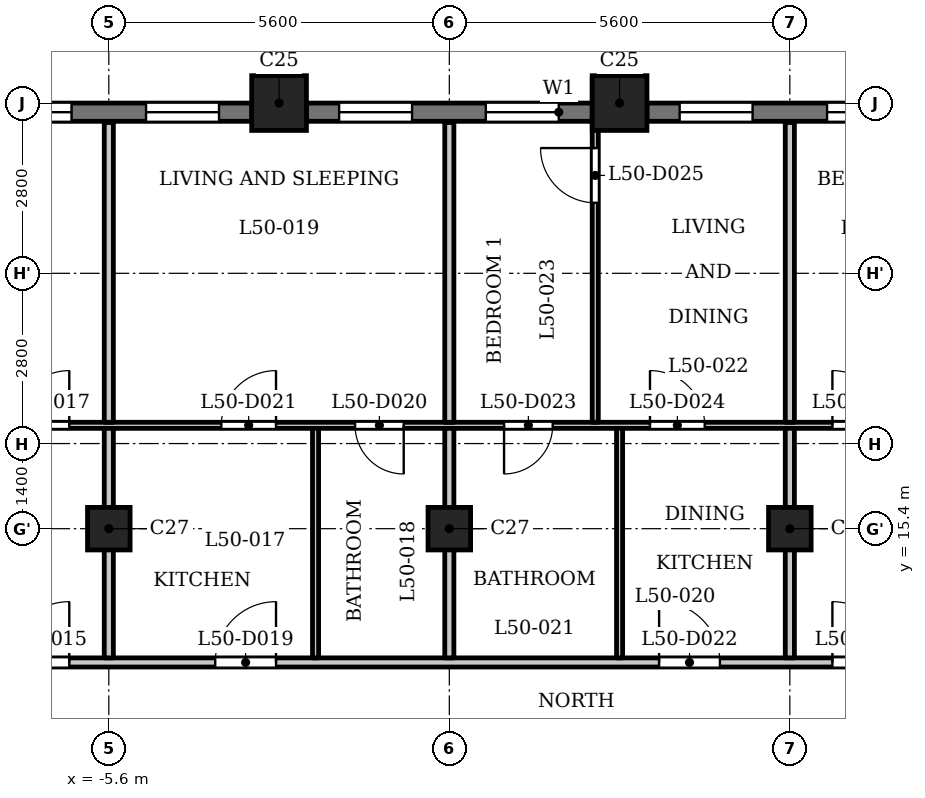
"""IFC4 building model, lengths in metres.
Left out: names, types, materials, properties, quantities, classifications, styles, units other than length and angle.
Written with IfcOpenShell. Run it as: python <this file> out.ifc"""

import sys

from ifc_helpers import new_model, si_unit, direction, frame, frame_2d, origin, origin_2d, place, context, subcontext, project, spatial, rectangle, extrude, element, fill, save


model = new_model("IFC4")
c1 = context("Model", 3, precision=1e-05, world=origin(), true_north=direction((0.0, 1.0)))
c2 = subcontext(c1, "Body", "Model", "MODEL_VIEW")
j1 = project(units=[si_unit("LENGTHUNIT", "METRE"), si_unit("PLANEANGLEUNIT", "RADIAN")], contexts=[c1])
p1 = place(None, origin())
s1 = spatial("IfcSite", under=j1, at=p1, CompositionType="ELEMENT")
p2 = place(p1, origin())
s2 = spatial("IfcBuilding", under=s1, at=p2, CompositionType="ELEMENT")
p3 = place(p2, frame((0.0, 0.0, 195.9)))
s3 = spatial("IfcBuildingStorey", under=s2, at=p3, CompositionType="ELEMENT", Elevation=195.9)
for number, where, z_axis, x_axis in (
    (1, (2.8, 22.4, 0.0), (0.0, 0.0, 1.0), (1.0, 0.0, 0.0)),
    (2, (-2.8, 22.4, 0.0), (0.0, 0.0, 1.0), (1.0, 0.0, 0.0)),
):
    element("IfcColumn", number, at=place(p3, frame(where, z_axis=z_axis, x_axis=x_axis)), inside=s3, PredefinedType="COLUMN", context=c2, shape_type="SweptSolid", body=[
        extrude(rectangle(XDim=0.9, YDim=0.9, at=origin_2d()), origin(), (0.0, 0.0, 1.0), 3.5),
    ])
for number, where, z_axis, x_axis in (
    (3, (-5.6, 15.4, 0.0), (0.0, 0.0, 1.0), (1.0, 0.0, 0.0)),
    (4, (0.0, 15.4, 0.0), (0.0, 0.0, 1.0), (1.0, 0.0, 0.0)),
    (5, (5.6, 15.4, 0.0), (0.0, 0.0, 1.0), (1.0, 0.0, 0.0)),
):
    element("IfcColumn", number, at=place(p3, frame(where, z_axis=z_axis, x_axis=x_axis)), inside=s3, PredefinedType="COLUMN", context=c2, shape_type="SweptSolid", body=[
        extrude(rectangle(XDim=0.7, YDim=0.7, at=origin_2d()), origin(), (0.0, 0.0, 1.0), 3.5),
    ])
p4 = place(p3, frame((7.95, 22.25, 0.0), z_axis=(0.0, 0.0, 1.0), x_axis=(-1.0, 0.0, 0.0)))
e6 = element("IfcWall", 6, at=p4, inside=s3, PredefinedType="SOLIDWALL", context=c2, shape_type="SweptSolid", body=[
    extrude(rectangle(XDim=4.7, YDim=0.3, at=frame_2d((2.35, 0.0))), origin(), (0.0, 0.0, 1.0), 2.5),
])
p5 = place(p4, frame((0.538, 0.0, 0.6)))
e7 = element("IfcOpeningElement", 7, at=p5, cuts=e6, PredefinedType="OPENING", context=c2, shape_type="SweptSolid", body=[
    extrude(rectangle(XDim=1.2, YDim=1.55, at=frame_2d((0.6, 0.775))), frame((0.0, 0.16, 0.0), z_axis=(0.0, -1.0, 0.0), x_axis=(1.0, 0.0, 0.0)), (0.0, 0.0, 1.0), 0.32),
])
p6 = place(p4, frame((2.962, 0.0, 0.6)))
e8 = element("IfcOpeningElement", 8, at=p6, cuts=e6, PredefinedType="OPENING", context=c2, shape_type="SweptSolid", body=[
    extrude(rectangle(XDim=1.2, YDim=1.55, at=frame_2d((0.6, 0.775))), frame((0.0, 0.16, 0.0), z_axis=(0.0, -1.0, 0.0), x_axis=(1.0, 0.0, 0.0)), (0.0, 0.0, 1.0), 0.32),
])
p7 = place(p3, frame((2.35, 22.25, 0.0), z_axis=(0.0, 0.0, 1.0), x_axis=(-1.0, 0.0, 0.0)))
e9 = element("IfcWall", 9, at=p7, inside=s3, PredefinedType="SOLIDWALL", context=c2, shape_type="SweptSolid", body=[
    extrude(rectangle(XDim=4.7, YDim=0.3, at=frame_2d((2.35, 0.0))), origin(), (0.0, 0.0, 1.0), 2.5),
])
p8 = place(p7, frame((0.55, 0.0, 0.6)))
e10 = element("IfcOpeningElement", 10, at=p8, cuts=e9, PredefinedType="OPENING", context=c2, shape_type="SweptSolid", body=[
    extrude(rectangle(XDim=1.2, YDim=1.55, at=frame_2d((0.6, 0.775))), frame((0.0, 0.16, 0.0), z_axis=(0.0, -1.0, 0.0), x_axis=(1.0, 0.0, 0.0)), (0.0, 0.0, 1.0), 0.32),
])
p9 = place(p7, frame((2.962, 0.0, 0.6)))
e11 = element("IfcOpeningElement", 11, at=p9, cuts=e9, PredefinedType="OPENING", context=c2, shape_type="SweptSolid", body=[
    extrude(rectangle(XDim=1.2, YDim=1.55, at=frame_2d((0.6, 0.775))), frame((0.0, 0.16, 0.0), z_axis=(0.0, -1.0, 0.0), x_axis=(1.0, 0.0, 0.0)), (0.0, 0.0, 1.0), 0.32),
])
p10 = place(p3, frame((-3.25, 22.25, 0.0), z_axis=(0.0, 0.0, 1.0), x_axis=(-1.0, 0.0, 0.0)))
e12 = element("IfcWall", 12, at=p10, inside=s3, PredefinedType="SOLIDWALL", context=c2, shape_type="SweptSolid", body=[
    extrude(rectangle(XDim=4.7, YDim=0.3, at=frame_2d((2.35, 0.0))), origin(), (0.0, 0.0, 1.0), 2.5),
])
p11 = place(p10, frame((0.538, 0.0, 0.6)))
e13 = element("IfcOpeningElement", 13, at=p11, cuts=e12, PredefinedType="OPENING", context=c2, shape_type="SweptSolid", body=[
    extrude(rectangle(XDim=1.2, YDim=1.55, at=frame_2d((0.6, 0.775))), frame((0.0, 0.16, 0.0), z_axis=(0.0, -1.0, 0.0), x_axis=(1.0, 0.0, 0.0)), (0.0, 0.0, 1.0), 0.32),
])
p12 = place(p10, frame((2.962, 0.0, 0.6)))
e14 = element("IfcOpeningElement", 14, at=p12, cuts=e12, PredefinedType="OPENING", context=c2, shape_type="SweptSolid", body=[
    extrude(rectangle(XDim=1.2, YDim=1.55, at=frame_2d((0.6, 0.775))), frame((0.0, 0.16, 0.0), z_axis=(0.0, -1.0, 0.0), x_axis=(1.0, 0.0, 0.0)), (0.0, 0.0, 1.0), 0.32),
])
p13 = place(p3, frame((-17.4, 13.2, 0.0), z_axis=(0.0, 0.0, 1.0), x_axis=(1.0, 0.0, 0.0)))
e15 = element("IfcWall", 15, at=p13, inside=s3, PredefinedType="PARTITIONING", context=c2, shape_type="SweptSolid", body=[
    extrude(rectangle(XDim=34.8, YDim=0.15, at=frame_2d((17.4, 0.0))), origin(), (0.0, 0.0, 1.0), 3.2),
])
p14 = place(p13, frame((0.25, 0.0, 0.0)))
e16 = element("IfcOpeningElement", 16, at=p14, cuts=e15, PredefinedType="OPENING", context=c2, shape_type="SweptSolid", body=[
    extrude(rectangle(XDim=1.0, YDim=2.1, at=frame_2d((0.5, 1.05))), frame((0.0, 0.085, 0.0), z_axis=(0.0, -1.0, 0.0), x_axis=(1.0, 0.0, 0.0)), (0.0, 0.0, 1.0), 0.17),
])
p15 = place(p13, frame((33.65, 0.0, 0.0)))
e17 = element("IfcOpeningElement", 17, at=p15, cuts=e15, PredefinedType="OPENING", context=c2, shape_type="SweptSolid", body=[
    extrude(rectangle(XDim=1.0, YDim=2.1, at=frame_2d((0.5, 1.05))), frame((0.0, 0.085, 0.0), z_axis=(0.0, -1.0, 0.0), x_axis=(1.0, 0.0, 0.0)), (0.0, 0.0, 1.0), 0.17),
])
p16 = place(p13, frame((10.15, 0.0, 0.0)))
e18 = element("IfcOpeningElement", 18, at=p16, cuts=e15, PredefinedType="OPENING", context=c2, shape_type="SweptSolid", body=[
    extrude(rectangle(XDim=1.0, YDim=2.1, at=frame_2d((0.5, 1.05))), frame((0.0, 0.085, 0.0), z_axis=(0.0, -1.0, 0.0), x_axis=(1.0, 0.0, 0.0)), (0.0, 0.0, 1.0), 0.17),
])
p17 = place(p13, frame((13.55, 0.0, 0.0)))
e19 = element("IfcOpeningElement", 19, at=p17, cuts=e15, PredefinedType="OPENING", context=c2, shape_type="SweptSolid", body=[
    extrude(rectangle(XDim=1.0, YDim=2.1, at=frame_2d((0.5, 1.05))), frame((0.0, 0.085, 0.0), z_axis=(0.0, -1.0, 0.0), x_axis=(1.0, 0.0, 0.0)), (0.0, 0.0, 1.0), 0.17),
])
p18 = place(p13, frame((20.85, 0.0, 0.0)))
e20 = element("IfcOpeningElement", 20, at=p18, cuts=e15, PredefinedType="OPENING", context=c2, shape_type="SweptSolid", body=[
    extrude(rectangle(XDim=1.0, YDim=2.1, at=frame_2d((0.5, 1.05))), frame((0.0, 0.085, 0.0), z_axis=(0.0, -1.0, 0.0), x_axis=(1.0, 0.0, 0.0)), (0.0, 0.0, 1.0), 0.17),
])
p19 = place(p13, frame((23.7, 0.0, 0.0)))
e21 = element("IfcOpeningElement", 21, at=p19, cuts=e15, PredefinedType="OPENING", context=c2, shape_type="SweptSolid", body=[
    extrude(rectangle(XDim=1.0, YDim=2.1, at=frame_2d((0.5, 1.05))), frame((0.0, 0.085, 0.0), z_axis=(0.0, -1.0, 0.0), x_axis=(1.0, 0.0, 0.0)), (0.0, 0.0, 1.0), 0.17),
])
p20 = place(p3, frame((-16.725, 17.1, 0.0), z_axis=(0.0, 0.0, 1.0), x_axis=(1.0, 0.0, 0.0)))
e22 = element("IfcWall", 22, at=p20, inside=s3, PredefinedType="PARTITIONING", context=c2, shape_type="SweptSolid", body=[
    extrude(rectangle(XDim=33.45, YDim=0.1, at=frame_2d((16.725, 0.0))), origin(), (0.0, 0.0, 1.0), 3.2),
])
p21 = place(p20, frame((4.075, 0.0, 0.0)))
e23 = element("IfcOpeningElement", 23, at=p21, cuts=e22, PredefinedType="OPENING", context=c2, shape_type="SweptSolid", body=[
    extrude(rectangle(XDim=0.8, YDim=2.1, at=frame_2d((0.4, 1.05))), frame((0.0, 0.06, 0.0), z_axis=(0.0, -1.0, 0.0), x_axis=(1.0, 0.0, 0.0)), (0.0, 0.0, 1.0), 0.12),
])
p22 = place(p20, frame((9.575, 0.0, 0.0)))
e24 = element("IfcOpeningElement", 24, at=p22, cuts=e22, PredefinedType="OPENING", context=c2, shape_type="SweptSolid", body=[
    extrude(rectangle(XDim=0.9, YDim=2.1, at=frame_2d((0.45, 1.05))), frame((0.0, 0.06, 0.0), z_axis=(0.0, -1.0, 0.0), x_axis=(1.0, 0.0, 0.0)), (0.0, 0.0, 1.0), 0.12),
])
p23 = place(p20, frame((15.175, 0.0, 0.0)))
e25 = element("IfcOpeningElement", 25, at=p23, cuts=e22, PredefinedType="OPENING", context=c2, shape_type="SweptSolid", body=[
    extrude(rectangle(XDim=0.8, YDim=2.1, at=frame_2d((0.4, 1.05))), frame((0.0, 0.06, 0.0), z_axis=(0.0, -1.0, 0.0), x_axis=(1.0, 0.0, 0.0)), (0.0, 0.0, 1.0), 0.12),
])
p24 = place(p20, frame((12.975, 0.0, 0.0)))
e26 = element("IfcOpeningElement", 26, at=p24, cuts=e22, PredefinedType="OPENING", context=c2, shape_type="SweptSolid", body=[
    extrude(rectangle(XDim=0.9, YDim=2.1, at=frame_2d((0.45, 1.05))), frame((0.0, 0.06, 0.0), z_axis=(0.0, -1.0, 0.0), x_axis=(1.0, 0.0, 0.0)), (0.0, 0.0, 1.0), 0.12),
])
p25 = place(p20, frame((17.625, 0.0, 0.0)))
e27 = element("IfcOpeningElement", 27, at=p25, cuts=e22, PredefinedType="OPENING", context=c2, shape_type="SweptSolid", body=[
    extrude(rectangle(XDim=0.8, YDim=2.1, at=frame_2d((0.4, 1.05))), frame((0.0, 0.06, 0.0), z_axis=(0.0, -1.0, 0.0), x_axis=(1.0, 0.0, 0.0)), (0.0, 0.0, 1.0), 0.12),
])
p26 = place(p20, frame((20.025, 0.0, 0.0)))
e28 = element("IfcOpeningElement", 28, at=p26, cuts=e22, PredefinedType="OPENING", context=c2, shape_type="SweptSolid", body=[
    extrude(rectangle(XDim=0.9, YDim=2.1, at=frame_2d((0.45, 1.05))), frame((0.0, 0.06, 0.0), z_axis=(0.0, -1.0, 0.0), x_axis=(1.0, 0.0, 0.0)), (0.0, 0.0, 1.0), 0.12),
])
p27 = place(p20, frame((31.975, 0.0, 0.0)))
e29 = element("IfcOpeningElement", 29, at=p27, cuts=e22, PredefinedType="OPENING", context=c2, shape_type="SweptSolid", body=[
    extrude(rectangle(XDim=0.8, YDim=2.1, at=frame_2d((0.4, 1.05))), frame((0.0, 0.06, 0.0), z_axis=(0.0, -1.0, 0.0), x_axis=(1.0, 0.0, 0.0)), (0.0, 0.0, 1.0), 0.12),
])
p28 = place(p20, frame((29.775, 0.0, 0.0)))
e30 = element("IfcOpeningElement", 30, at=p28, cuts=e22, PredefinedType="OPENING", context=c2, shape_type="SweptSolid", body=[
    extrude(rectangle(XDim=0.9, YDim=2.1, at=frame_2d((0.45, 1.05))), frame((0.0, 0.06, 0.0), z_axis=(0.0, -1.0, 0.0), x_axis=(1.0, 0.0, 0.0)), (0.0, 0.0, 1.0), 0.12),
])
p29 = place(p20, frame((23.025, 0.0, 0.0)))
e31 = element("IfcOpeningElement", 31, at=p29, cuts=e22, PredefinedType="OPENING", context=c2, shape_type="SweptSolid", body=[
    extrude(rectangle(XDim=0.9, YDim=2.1, at=frame_2d((0.45, 1.05))), frame((0.0, 0.06, 0.0), z_axis=(0.0, -1.0, 0.0), x_axis=(1.0, 0.0, 0.0)), (0.0, 0.0, 1.0), 0.12),
])
p30 = place(p20, frame((26.125, 0.0, 0.0)))
e32 = element("IfcOpeningElement", 32, at=p30, cuts=e22, PredefinedType="OPENING", context=c2, shape_type="SweptSolid", body=[
    extrude(rectangle(XDim=0.9, YDim=2.1, at=frame_2d((0.45, 1.05))), frame((0.0, 0.06, 0.0), z_axis=(0.0, -1.0, 0.0), x_axis=(1.0, 0.0, 0.0)), (0.0, 0.0, 1.0), 0.12),
])
p31 = place(p3, frame((-5.6, 13.275, 0.0), z_axis=(0.0, 0.0, 1.0), x_axis=(0.0, 1.0, 0.0)))
e33 = element("IfcWall", 33, at=p31, inside=s3, PredefinedType="PARTITIONING", context=c2, shape_type="SweptSolid", body=[
    extrude(rectangle(XDim=3.775, YDim=0.15, at=frame_2d((1.888, 0.0))), origin(), (0.0, 0.0, 1.0), 3.2),
])
p32 = place(p3, frame((-5.6, 17.15, 0.0), z_axis=(0.0, 0.0, 1.0), x_axis=(0.0, 1.0, 0.0)))
e34 = element("IfcWall", 34, at=p32, inside=s3, PredefinedType="PARTITIONING", context=c2, shape_type="SweptSolid", body=[
    extrude(rectangle(XDim=4.93, YDim=0.15, at=frame_2d((2.465, 0.0))), origin(), (0.0, 0.0, 1.0), 3.2),
])
p33 = place(p3, frame((-2.2, 13.275, 0.0), z_axis=(0.0, 0.0, 1.0), x_axis=(0.0, 1.0, 0.0)))
e35 = element("IfcWall", 35, at=p33, inside=s3, PredefinedType="PARTITIONING", context=c2, shape_type="SweptSolid", body=[
    extrude(rectangle(XDim=3.775, YDim=0.1, at=frame_2d((1.888, 0.0))), origin(), (0.0, 0.0, 1.0), 3.2),
])
p34 = place(p3, frame((0.0, 13.275, 0.0), z_axis=(0.0, 0.0, 1.0), x_axis=(0.0, 1.0, 0.0)))
e36 = element("IfcWall", 36, at=p34, inside=s3, PredefinedType="PARTITIONING", context=c2, shape_type="SweptSolid", body=[
    extrude(rectangle(XDim=3.775, YDim=0.15, at=frame_2d((1.888, 0.0))), origin(), (0.0, 0.0, 1.0), 3.2),
])
p35 = place(p3, frame((0.0, 17.15, 0.0), z_axis=(0.0, 0.0, 1.0), x_axis=(0.0, 1.0, 0.0)))
e37 = element("IfcWall", 37, at=p35, inside=s3, PredefinedType="PARTITIONING", context=c2, shape_type="SweptSolid", body=[
    extrude(rectangle(XDim=4.93, YDim=0.15, at=frame_2d((2.465, 0.0))), origin(), (0.0, 0.0, 1.0), 3.2),
])
p36 = place(p3, frame((2.4, 17.15, 0.0), z_axis=(0.0, 0.0, 1.0), x_axis=(0.0, 1.0, 0.0)))
e38 = element("IfcWall", 38, at=p36, inside=s3, PredefinedType="PARTITIONING", context=c2, shape_type="SweptSolid", body=[
    extrude(rectangle(XDim=5.68, YDim=0.1, at=frame_2d((2.84, 0.0))), origin(), (0.0, 0.0, 1.0), 3.2),
])
p37 = place(p36, frame((3.61, 0.0, 0.0)))
e39 = element("IfcOpeningElement", 39, at=p37, cuts=e38, PredefinedType="OPENING", context=c2, shape_type="SweptSolid", body=[
    extrude(rectangle(XDim=0.9, YDim=2.1, at=frame_2d((0.45, 1.05))), frame((0.0, 0.06, 0.0), z_axis=(0.0, -1.0, 0.0), x_axis=(1.0, 0.0, 0.0)), (0.0, 0.0, 1.0), 0.12),
])
p38 = place(p3, frame((2.8, 13.275, 0.0), z_axis=(0.0, 0.0, 1.0), x_axis=(0.0, 1.0, 0.0)))
e40 = element("IfcWall", 40, at=p38, inside=s3, PredefinedType="PARTITIONING", context=c2, shape_type="SweptSolid", body=[
    extrude(rectangle(XDim=3.775, YDim=0.1, at=frame_2d((1.888, 0.0))), origin(), (0.0, 0.0, 1.0), 3.2),
])
p39 = place(p3, frame((5.6, 13.275, 0.0), z_axis=(0.0, 0.0, 1.0), x_axis=(0.0, 1.0, 0.0)))
e41 = element("IfcWall", 41, at=p39, inside=s3, PredefinedType="PARTITIONING", context=c2, shape_type="SweptSolid", body=[
    extrude(rectangle(XDim=3.775, YDim=0.15, at=frame_2d((1.888, 0.0))), origin(), (0.0, 0.0, 1.0), 3.2),
])
p40 = place(p3, frame((5.6, 17.15, 0.0), z_axis=(0.0, 0.0, 1.0), x_axis=(0.0, 1.0, 0.0)))
e42 = element("IfcWall", 42, at=p40, inside=s3, PredefinedType="PARTITIONING", context=c2, shape_type="SweptSolid", body=[
    extrude(rectangle(XDim=4.93, YDim=0.15, at=frame_2d((2.465, 0.0))), origin(), (0.0, 0.0, 1.0), 3.2),
])
p41 = place(p16, origin())
e43 = element("IfcDoor", 43, at=p41, inside=s3, OperationType="SINGLE_SWING_LEFT", PredefinedType="DOOR", context=c2, shape_type="SweptSolid", body=[
    extrude(rectangle(XDim=1.0, YDim=2.1, at=frame_2d((0.5, 1.05))), frame((0.0, 0.025, 0.0), z_axis=(0.0, -1.0, 0.0), x_axis=(1.0, 0.0, 0.0)), (0.0, 0.0, 1.0), 0.05),
])
fill(e18, e43)
p42 = place(p22, origin())
e44 = element("IfcDoor", 44, at=p42, inside=s3, OperationType="SINGLE_SWING_LEFT", PredefinedType="DOOR", context=c2, shape_type="SweptSolid", body=[
    extrude(rectangle(XDim=0.9, YDim=2.1, at=frame_2d((0.45, 1.05))), frame((0.0, 0.025, 0.0), z_axis=(0.0, -1.0, 0.0), x_axis=(1.0, 0.0, 0.0)), (0.0, 0.0, 1.0), 0.05),
])
fill(e24, e44)
p43 = place(p17, origin())
e45 = element("IfcDoor", 45, at=p43, inside=s3, OperationType="SINGLE_SWING_LEFT", PredefinedType="DOOR", context=c2, shape_type="SweptSolid", body=[
    extrude(rectangle(XDim=1.0, YDim=2.1, at=frame_2d((0.5, 1.05))), frame((0.0, 0.025, 0.0), z_axis=(0.0, -1.0, 0.0), x_axis=(1.0, 0.0, 0.0)), (0.0, 0.0, 1.0), 0.05),
])
fill(e19, e45)
p44 = place(p23, origin())
e46 = element("IfcDoor", 46, at=p44, inside=s3, OperationType="SINGLE_SWING_RIGHT", PredefinedType="DOOR", context=c2, shape_type="SweptSolid", body=[
    extrude(rectangle(XDim=0.8, YDim=2.1, at=frame_2d((0.4, 1.05))), frame((0.0, 0.025, 0.0), z_axis=(0.0, -1.0, 0.0), x_axis=(1.0, 0.0, 0.0)), (0.0, 0.0, 1.0), 0.05),
])
fill(e25, e46)
p45 = place(p24, origin())
e47 = element("IfcDoor", 47, at=p45, inside=s3, OperationType="SINGLE_SWING_LEFT", PredefinedType="DOOR", context=c2, shape_type="SweptSolid", body=[
    extrude(rectangle(XDim=0.9, YDim=2.1, at=frame_2d((0.45, 1.05))), frame((0.0, 0.025, 0.0), z_axis=(0.0, -1.0, 0.0), x_axis=(1.0, 0.0, 0.0)), (0.0, 0.0, 1.0), 0.05),
])
fill(e26, e47)
p46 = place(p18, origin())
e48 = element("IfcDoor", 48, at=p46, inside=s3, OperationType="SINGLE_SWING_RIGHT", PredefinedType="DOOR", context=c2, shape_type="SweptSolid", body=[
    extrude(rectangle(XDim=1.0, YDim=2.1, at=frame_2d((0.5, 1.05))), frame((0.0, 0.025, 0.0), z_axis=(0.0, -1.0, 0.0), x_axis=(1.0, 0.0, 0.0)), (0.0, 0.0, 1.0), 0.05),
])
fill(e20, e48)
p47 = place(p25, origin())
e49 = element("IfcDoor", 49, at=p47, inside=s3, OperationType="SINGLE_SWING_LEFT", PredefinedType="DOOR", context=c2, shape_type="SweptSolid", body=[
    extrude(rectangle(XDim=0.8, YDim=2.1, at=frame_2d((0.4, 1.05))), frame((0.0, 0.025, 0.0), z_axis=(0.0, -1.0, 0.0), x_axis=(1.0, 0.0, 0.0)), (0.0, 0.0, 1.0), 0.05),
])
fill(e27, e49)
p48 = place(p26, origin())
e50 = element("IfcDoor", 50, at=p48, inside=s3, OperationType="SINGLE_SWING_RIGHT", PredefinedType="DOOR", context=c2, shape_type="SweptSolid", body=[
    extrude(rectangle(XDim=0.9, YDim=2.1, at=frame_2d((0.45, 1.05))), frame((0.0, 0.025, 0.0), z_axis=(0.0, -1.0, 0.0), x_axis=(1.0, 0.0, 0.0)), (0.0, 0.0, 1.0), 0.05),
])
fill(e28, e50)
p49 = place(p37, origin())
e51 = element("IfcDoor", 51, at=p49, inside=s3, OperationType="SINGLE_SWING_LEFT", PredefinedType="DOOR", context=c2, shape_type="SweptSolid", body=[
    extrude(rectangle(XDim=0.9, YDim=2.1, at=frame_2d((0.45, 1.05))), frame((0.0, 0.025, 0.0), z_axis=(0.0, -1.0, 0.0), x_axis=(1.0, 0.0, 0.0)), (0.0, 0.0, 1.0), 0.05),
])
fill(e39, e51)
p50 = place(p19, origin())
e52 = element("IfcDoor", 52, at=p50, inside=s3, OperationType="SINGLE_SWING_RIGHT", PredefinedType="DOOR", context=c2, shape_type="SweptSolid", body=[
    extrude(rectangle(XDim=1.0, YDim=2.1, at=frame_2d((0.5, 1.05))), frame((0.0, 0.025, 0.0), z_axis=(0.0, -1.0, 0.0), x_axis=(1.0, 0.0, 0.0)), (0.0, 0.0, 1.0), 0.05),
])
fill(e21, e52)
p51 = place(p29, origin())
e53 = element("IfcDoor", 53, at=p51, inside=s3, OperationType="SINGLE_SWING_RIGHT", PredefinedType="DOOR", context=c2, shape_type="SweptSolid", body=[
    extrude(rectangle(XDim=0.9, YDim=2.1, at=frame_2d((0.45, 1.05))), frame((0.0, 0.025, 0.0), z_axis=(0.0, -1.0, 0.0), x_axis=(1.0, 0.0, 0.0)), (0.0, 0.0, 1.0), 0.05),
])
fill(e31, e53)
p52 = place(p5, origin())
e54 = element("IfcWindow", 54, at=p52, inside=s3, PartitioningType="SINGLE_PANEL", PredefinedType="WINDOW", context=c2, shape_type="SweptSolid", body=[
    extrude(rectangle(XDim=1.2, YDim=1.55, at=frame_2d((0.6, 0.775))), frame((0.0, 0.03, 0.0), z_axis=(0.0, -1.0, 0.0), x_axis=(1.0, 0.0, 0.0)), (0.0, 0.0, 1.0), 0.06),
])
fill(e7, e54)
p53 = place(p6, origin())
e55 = element("IfcWindow", 55, at=p53, inside=s3, PartitioningType="SINGLE_PANEL", PredefinedType="WINDOW", context=c2, shape_type="SweptSolid", body=[
    extrude(rectangle(XDim=1.2, YDim=1.55, at=frame_2d((0.6, 0.775))), frame((0.0, 0.03, 0.0), z_axis=(0.0, -1.0, 0.0), x_axis=(1.0, 0.0, 0.0)), (0.0, 0.0, 1.0), 0.06),
])
fill(e8, e55)
p54 = place(p8, origin())
e56 = element("IfcWindow", 56, at=p54, inside=s3, PartitioningType="SINGLE_PANEL", PredefinedType="WINDOW", context=c2, shape_type="SweptSolid", body=[
    extrude(rectangle(XDim=1.2, YDim=1.55, at=frame_2d((0.6, 0.775))), frame((0.0, 0.03, 0.0), z_axis=(0.0, -1.0, 0.0), x_axis=(1.0, 0.0, 0.0)), (0.0, 0.0, 1.0), 0.06),
])
fill(e10, e56)
p55 = place(p9, origin())
e57 = element("IfcWindow", 57, at=p55, inside=s3, PartitioningType="SINGLE_PANEL", PredefinedType="WINDOW", context=c2, shape_type="SweptSolid", body=[
    extrude(rectangle(XDim=1.2, YDim=1.55, at=frame_2d((0.6, 0.775))), frame((0.0, 0.03, 0.0), z_axis=(0.0, -1.0, 0.0), x_axis=(1.0, 0.0, 0.0)), (0.0, 0.0, 1.0), 0.06),
])
fill(e11, e57)
p56 = place(p11, origin())
e58 = element("IfcWindow", 58, at=p56, inside=s3, PartitioningType="SINGLE_PANEL", PredefinedType="WINDOW", context=c2, shape_type="SweptSolid", body=[
    extrude(rectangle(XDim=1.2, YDim=1.55, at=frame_2d((0.6, 0.775))), frame((0.0, 0.03, 0.0), z_axis=(0.0, -1.0, 0.0), x_axis=(1.0, 0.0, 0.0)), (0.0, 0.0, 1.0), 0.06),
])
fill(e13, e58)
p57 = place(p12, origin())
e59 = element("IfcWindow", 59, at=p57, inside=s3, PartitioningType="SINGLE_PANEL", PredefinedType="WINDOW", context=c2, shape_type="SweptSolid", body=[
    extrude(rectangle(XDim=1.2, YDim=1.55, at=frame_2d((0.6, 0.775))), frame((0.0, 0.03, 0.0), z_axis=(0.0, -1.0, 0.0), x_axis=(1.0, 0.0, 0.0)), (0.0, 0.0, 1.0), 0.06),
])
fill(e14, e59)
save(model, sys.argv[1])
